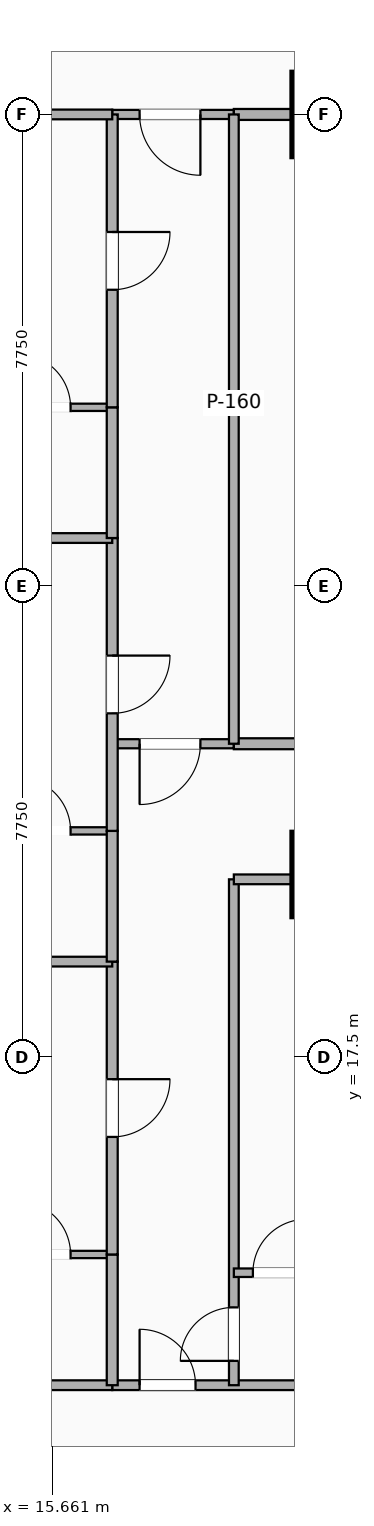
"""IFC4 building model, lengths in metres.
Left out: names, types, materials, properties, quantities, classifications, styles, units other than length and angle.
Written with IfcOpenShell. Run it as: python <this file> out.ifc"""

import sys

from ifc_helpers import new_model, si_unit, direction, frame, frame_2d, origin, origin_2d, place, context, subcontext, project, spatial, rectangle, extrude, element, fill, save


model = new_model("IFC4")
c1 = context("Model", 3, precision=1e-05, world=origin(), true_north=direction((0.0, 1.0)))
c2 = subcontext(c1, "Body", "Model", "MODEL_VIEW")
j1 = project(units=[si_unit("LENGTHUNIT", "METRE"), si_unit("PLANEANGLEUNIT", "RADIAN")], contexts=[c1])
p1 = place(None, origin())
s1 = spatial("IfcSite", under=j1, at=p1, CompositionType="ELEMENT")
p2 = place(p1, origin())
s2 = spatial("IfcBuilding", under=s1, at=p2, CompositionType="ELEMENT")
p3 = place(p2, frame((0.0, 0.0, 68.4)))
s3 = spatial("IfcBuildingStorey", under=s2, at=p3, CompositionType="ELEMENT", Elevation=68.4)
for number, where, z_axis, x_axis in (
    (1, (20.3, 20.5, -0.28), (0.0, 0.0, 1.0), (1.0, 0.0, 0.0)),
    (2, (20.3, 33.0, -0.28), (0.0, 0.0, 1.0), (1.0, 0.0, 0.0)),
):
    element("IfcColumn", number, at=place(p3, frame(where, z_axis=z_axis, x_axis=x_axis)), inside=s3, PredefinedType="COLUMN", context=c2, shape_type="SweptSolid", body=[
        extrude(rectangle(XDim=1.4, YDim=1.4, at=origin_2d()), origin(), (0.0, 0.0, 1.0), 3.5),
    ])
p4 = place(p3, frame((16.65, 12.1, 0.0), z_axis=(0.0, 0.0, 1.0), x_axis=(1.0, 0.0, 0.0)))
e3 = element("IfcWall", 3, at=p4, inside=s3, PredefinedType="PARTITIONING", context=c2, shape_type="SweptSolid", body=[
    extrude(rectangle(XDim=3.65, YDim=0.16, at=frame_2d((1.825, 0.0))), origin(), (0.0, 0.0, 1.0), 2.51),
])
p5 = place(p4, frame((1.37, 0.0, 0.0), z_axis=(0.0, 0.0, 1.0), x_axis=(-1.0, 0.0, 0.0)))
e4 = element("IfcOpeningElement", 4, at=p5, cuts=e3, PredefinedType="OPENING", context=c2, shape_type="SweptSolid", body=[
    extrude(rectangle(XDim=0.92, YDim=2.08, at=frame_2d((0.46, 1.04))), frame((0.0, 0.09, 0.0), z_axis=(0.0, -1.0, 0.0), x_axis=(1.0, 0.0, 0.0)), (0.0, 0.0, 1.0), 0.18),
])
p6 = place(p3, frame((18.65, 12.1, 0.0), z_axis=(0.0, 0.0, 1.0), x_axis=(0.0, 1.0, 0.0)))
e5 = element("IfcWall", 5, at=p6, inside=s3, PredefinedType="PARTITIONING", context=c2, shape_type="SweptSolid", body=[
    extrude(rectangle(XDim=8.32, YDim=0.16, at=frame_2d((4.16, 0.0))), origin(), (0.0, 0.0, 1.0), 2.51),
])
p7 = place(p6, frame((1.28, 0.0, 0.0), z_axis=(0.0, 0.0, 1.0), x_axis=(-1.0, 0.0, 0.0)))
e6 = element("IfcOpeningElement", 6, at=p7, cuts=e5, PredefinedType="OPENING", context=c2, shape_type="SweptSolid", body=[
    extrude(rectangle(XDim=0.88, YDim=2.08, at=frame_2d((0.44, 1.04))), frame((0.0, 0.09, 0.0), z_axis=(0.0, -1.0, 0.0), x_axis=(1.0, 0.0, 0.0)), (0.0, 0.0, 1.0), 0.18),
])
p8 = place(p3, frame((18.65, 20.42, 0.0), z_axis=(0.0, 0.0, 1.0), x_axis=(1.0, 0.0, 0.0)))
e7 = element("IfcWall", 7, at=p8, inside=s3, PredefinedType="PARTITIONING", context=c2, shape_type="SweptSolid", body=[
    extrude(rectangle(XDim=1.65, YDim=0.16, at=frame_2d((0.825, 0.0))), origin(), (0.0, 0.0, 1.0), 2.51),
])
p9 = place(p3, frame((16.65, 22.65, 0.0), z_axis=(0.0, 0.0, 1.0), x_axis=(1.0, 0.0, 0.0)))
e8 = element("IfcWall", 8, at=p9, inside=s3, PredefinedType="PARTITIONING", context=c2, shape_type="SweptSolid", body=[
    extrude(rectangle(XDim=2.0, YDim=0.15, at=frame_2d((1.0, 0.0))), origin(), (0.0, 0.0, 1.0), 3.22),
])
p10 = place(p9, frame((0.45, 0.0, 0.0)))
e9 = element("IfcOpeningElement", 9, at=p10, cuts=e8, PredefinedType="OPENING", context=c2, shape_type="SweptSolid", body=[
    extrude(rectangle(XDim=1.0, YDim=2.15, at=frame_2d((0.5, 1.075))), frame((0.0, 0.085, 0.0), z_axis=(0.0, -1.0, 0.0), x_axis=(1.0, 0.0, 0.0)), (0.0, 0.0, 1.0), 0.17),
])
p11 = place(p3, frame((16.65, 33.0, 0.0), z_axis=(0.0, 0.0, 1.0), x_axis=(1.0, 0.0, 0.0)))
e10 = element("IfcWall", 10, at=p11, inside=s3, PredefinedType="PARTITIONING", context=c2, shape_type="SweptSolid", body=[
    extrude(rectangle(XDim=2.0, YDim=0.15, at=frame_2d((1.0, 0.0))), origin(), (0.0, 0.0, 1.0), 2.51),
])
p12 = place(p11, frame((0.45, 0.0, 0.0)))
e11 = element("IfcOpeningElement", 11, at=p12, cuts=e10, PredefinedType="OPENING", context=c2, shape_type="SweptSolid", body=[
    extrude(rectangle(XDim=1.0, YDim=2.15, at=frame_2d((0.5, 1.075))), frame((0.0, 0.085, 0.0), z_axis=(0.0, -1.0, 0.0), x_axis=(1.0, 0.0, 0.0)), (0.0, 0.0, 1.0), 0.17),
])
p13 = place(p3, frame((18.65, 22.65, 0.0), z_axis=(0.0, 0.0, 1.0), x_axis=(1.0, 0.0, 0.0)))
e12 = element("IfcWall", 12, at=p13, inside=s3, PredefinedType="PARTITIONING", context=c2, shape_type="SweptSolid", body=[
    extrude(rectangle(XDim=5.45, YDim=0.18, at=frame_2d((2.725, 0.0))), origin(), (0.0, 0.0, 1.0), 2.51),
])
p14 = place(p13, frame((2.25, 0.0, 0.0)))
e13 = element("IfcOpeningElement", 13, at=p14, cuts=e12, PredefinedType="OPENING", context=c2, shape_type="SweptSolid", body=[
    extrude(rectangle(XDim=0.95, YDim=2.15, at=frame_2d((0.475, 1.075))), frame((0.0, 0.1, 0.0), z_axis=(0.0, -1.0, 0.0), x_axis=(1.0, 0.0, 0.0)), (0.0, 0.0, 1.0), 0.2),
])
p15 = place(p3, frame((18.65, 33.0, 0.0), z_axis=(0.0, 0.0, 1.0), x_axis=(1.0, 0.0, 0.0)))
e14 = element("IfcWall", 14, at=p15, inside=s3, PredefinedType="PARTITIONING", context=c2, shape_type="SweptSolid", body=[
    extrude(rectangle(XDim=5.45, YDim=0.18, at=frame_2d((2.725, 0.0))), origin(), (0.0, 0.0, 1.0), 2.51),
])
p16 = place(p3, frame((18.65, 22.65, 0.0), z_axis=(0.0, 0.0, 1.0), x_axis=(0.0, 1.0, 0.0)))
e15 = element("IfcWall", 15, at=p16, inside=s3, PredefinedType="PARTITIONING", context=c2, shape_type="SweptSolid", body=[
    extrude(rectangle(XDim=10.35, YDim=0.16, at=frame_2d((5.175, 0.0))), origin(), (0.0, 0.0, 1.0), 2.51),
])
p17 = place(p3, frame((11.47, 12.1, 0.0), z_axis=(0.0, 0.0, 1.0), x_axis=(1.0, 0.0, 0.0)))
e16 = element("IfcWall", 16, at=p17, inside=s3, PredefinedType="PARTITIONING", context=c2, shape_type="SweptSolid", body=[
    extrude(rectangle(XDim=5.18, YDim=0.16, at=frame_2d((2.59, 0.0))), origin(), (0.0, 0.0, 1.0), 2.583),
])
p18 = place(p3, frame((14.4, 14.25, 0.0), z_axis=(0.0, 0.0, 1.0), x_axis=(1.0, 0.0, 0.0)))
e17 = element("IfcWall", 17, at=p18, inside=s3, PredefinedType="PARTITIONING", context=c2, shape_type="SweptSolid", body=[
    extrude(rectangle(XDim=2.25, YDim=0.12, at=frame_2d((1.125, 0.0))), origin(), (0.0, 0.0, 1.0), 3.22),
])
p19 = place(p18, frame((1.565, 0.0, 0.0), z_axis=(0.0, 0.0, 1.0), x_axis=(-1.0, 0.0, 0.0)))
e18 = element("IfcOpeningElement", 18, at=p19, cuts=e17, PredefinedType="OPENING", context=c2, shape_type="SweptSolid", body=[
    extrude(rectangle(XDim=0.88, YDim=2.08, at=frame_2d((0.44, 1.04))), frame((0.0, 0.07, 0.0), z_axis=(0.0, -1.0, 0.0), x_axis=(1.0, 0.0, 0.0)), (0.0, 0.0, 1.0), 0.14),
])
p20 = place(p3, frame((16.65, 12.1, 0.0), z_axis=(0.0, 0.0, 1.0), x_axis=(0.0, 1.0, 0.0)))
e19 = element("IfcWall", 19, at=p20, inside=s3, PredefinedType="PARTITIONING", context=c2, shape_type="SweptSolid", body=[
    extrude(rectangle(XDim=2.15, YDim=0.18, at=frame_2d((1.075, 0.0))), origin(), (0.0, 0.0, 1.0), 2.902),
])
p21 = place(p3, frame((16.65, 14.25, 0.0), z_axis=(0.0, 0.0, 1.0), x_axis=(0.0, 1.0, 0.0)))
e20 = element("IfcWall", 20, at=p21, inside=s3, PredefinedType="PARTITIONING", context=c2, shape_type="SweptSolid", body=[
    extrude(rectangle(XDim=4.817, YDim=0.18, at=frame_2d((2.408, 0.0))), origin(), (0.0, 0.0, 1.0), 2.902),
])
p22 = place(p21, frame((1.933, 0.0, 0.0)))
e21 = element("IfcOpeningElement", 21, at=p22, cuts=e20, PredefinedType="OPENING", context=c2, shape_type="SweptSolid", body=[
    extrude(rectangle(XDim=0.95, YDim=2.15, at=frame_2d((0.475, 1.075))), frame((0.0, 0.1, 0.0), z_axis=(0.0, -1.0, 0.0), x_axis=(1.0, 0.0, 0.0)), (0.0, 0.0, 1.0), 0.2),
])
p23 = place(p3, frame((11.47, 19.067, 0.0), z_axis=(0.0, 0.0, 1.0), x_axis=(1.0, 0.0, 0.0)))
e22 = element("IfcWall", 22, at=p23, inside=s3, PredefinedType="PARTITIONING", context=c2, shape_type="SweptSolid", body=[
    extrude(rectangle(XDim=5.18, YDim=0.16, at=frame_2d((2.59, 0.0))), origin(), (0.0, 0.0, 1.0), 2.583),
])
p24 = place(p3, frame((14.4, 21.217, 0.0), z_axis=(0.0, 0.0, 1.0), x_axis=(1.0, 0.0, 0.0)))
e23 = element("IfcWall", 23, at=p24, inside=s3, PredefinedType="PARTITIONING", context=c2, shape_type="SweptSolid", body=[
    extrude(rectangle(XDim=2.25, YDim=0.12, at=frame_2d((1.125, 0.0))), origin(), (0.0, 0.0, 1.0), 3.22),
])
p25 = place(p24, frame((1.565, 0.0, 0.0), z_axis=(0.0, 0.0, 1.0), x_axis=(-1.0, 0.0, 0.0)))
e24 = element("IfcOpeningElement", 24, at=p25, cuts=e23, PredefinedType="OPENING", context=c2, shape_type="SweptSolid", body=[
    extrude(rectangle(XDim=0.88, YDim=2.08, at=frame_2d((0.44, 1.04))), frame((0.0, 0.07, 0.0), z_axis=(0.0, -1.0, 0.0), x_axis=(1.0, 0.0, 0.0)), (0.0, 0.0, 1.0), 0.14),
])
p26 = place(p3, frame((16.65, 19.067, 0.0), z_axis=(0.0, 0.0, 1.0), x_axis=(0.0, 1.0, 0.0)))
e25 = element("IfcWall", 25, at=p26, inside=s3, PredefinedType="PARTITIONING", context=c2, shape_type="SweptSolid", body=[
    extrude(rectangle(XDim=2.15, YDim=0.18, at=frame_2d((1.075, 0.0))), origin(), (0.0, 0.0, 1.0), 2.51),
])
p27 = place(p3, frame((16.65, 21.217, 0.0), z_axis=(0.0, 0.0, 1.0), x_axis=(0.0, 1.0, 0.0)))
e26 = element("IfcWall", 26, at=p27, inside=s3, PredefinedType="PARTITIONING", context=c2, shape_type="SweptSolid", body=[
    extrude(rectangle(XDim=4.816, YDim=0.18, at=frame_2d((2.408, 0.0))), origin(), (0.0, 0.0, 1.0), 2.788),
])
p28 = place(p27, frame((1.933, 0.0, 0.0)))
e27 = element("IfcOpeningElement", 27, at=p28, cuts=e26, PredefinedType="OPENING", context=c2, shape_type="SweptSolid", body=[
    extrude(rectangle(XDim=0.95, YDim=2.15, at=frame_2d((0.475, 1.075))), frame((0.0, 0.1, 0.0), z_axis=(0.0, -1.0, 0.0), x_axis=(1.0, 0.0, 0.0)), (0.0, 0.0, 1.0), 0.2),
])
p29 = place(p3, frame((11.47, 26.033, 0.0), z_axis=(0.0, 0.0, 1.0), x_axis=(1.0, 0.0, 0.0)))
e28 = element("IfcWall", 28, at=p29, inside=s3, PredefinedType="PARTITIONING", context=c2, shape_type="SweptSolid", body=[
    extrude(rectangle(XDim=5.18, YDim=0.16, at=frame_2d((2.59, 0.0))), origin(), (0.0, 0.0, 1.0), 2.583),
])
p30 = place(p3, frame((14.4, 28.183, 0.0), z_axis=(0.0, 0.0, 1.0), x_axis=(1.0, 0.0, 0.0)))
e29 = element("IfcWall", 29, at=p30, inside=s3, PredefinedType="PARTITIONING", context=c2, shape_type="SweptSolid", body=[
    extrude(rectangle(XDim=2.25, YDim=0.12, at=frame_2d((1.125, 0.0))), origin(), (0.0, 0.0, 1.0), 3.22),
])
p31 = place(p30, frame((1.565, 0.0, 0.0), z_axis=(0.0, 0.0, 1.0), x_axis=(-1.0, 0.0, 0.0)))
e30 = element("IfcOpeningElement", 30, at=p31, cuts=e29, PredefinedType="OPENING", context=c2, shape_type="SweptSolid", body=[
    extrude(rectangle(XDim=0.88, YDim=2.08, at=frame_2d((0.44, 1.04))), frame((0.0, 0.07, 0.0), z_axis=(0.0, -1.0, 0.0), x_axis=(1.0, 0.0, 0.0)), (0.0, 0.0, 1.0), 0.14),
])
p32 = place(p3, frame((16.65, 26.033, 0.0), z_axis=(0.0, 0.0, 1.0), x_axis=(0.0, 1.0, 0.0)))
e31 = element("IfcWall", 31, at=p32, inside=s3, PredefinedType="PARTITIONING", context=c2, shape_type="SweptSolid", body=[
    extrude(rectangle(XDim=2.15, YDim=0.18, at=frame_2d((1.075, 0.0))), origin(), (0.0, 0.0, 1.0), 3.22),
])
p33 = place(p3, frame((16.65, 28.183, 0.0), z_axis=(0.0, 0.0, 1.0), x_axis=(0.0, 1.0, 0.0)))
e32 = element("IfcWall", 32, at=p33, inside=s3, PredefinedType="PARTITIONING", context=c2, shape_type="SweptSolid", body=[
    extrude(rectangle(XDim=4.817, YDim=0.18, at=frame_2d((2.408, 0.0))), origin(), (0.0, 0.0, 1.0), 2.51),
])
p34 = place(p33, frame((1.933, 0.0, 0.0)))
e33 = element("IfcOpeningElement", 33, at=p34, cuts=e32, PredefinedType="OPENING", context=c2, shape_type="SweptSolid", body=[
    extrude(rectangle(XDim=0.95, YDim=2.15, at=frame_2d((0.475, 1.075))), frame((0.0, 0.1, 0.0), z_axis=(0.0, -1.0, 0.0), x_axis=(1.0, 0.0, 0.0)), (0.0, 0.0, 1.0), 0.2),
])
p35 = place(p3, frame((11.47, 33.0, 0.0), z_axis=(0.0, 0.0, 1.0), x_axis=(1.0, 0.0, 0.0)))
e34 = element("IfcWall", 34, at=p35, inside=s3, PredefinedType="PARTITIONING", context=c2, shape_type="SweptSolid", body=[
    extrude(rectangle(XDim=5.18, YDim=0.16, at=frame_2d((2.59, 0.0))), origin(), (0.0, 0.0, 1.0), 2.51),
])
p36 = place(p3, frame((18.65, 13.95, 0.0), z_axis=(0.0, 0.0, 1.0), x_axis=(1.0, 0.0, 0.0)))
e35 = element("IfcWall", 35, at=p36, inside=s3, PredefinedType="PARTITIONING", context=c2, shape_type="SweptSolid", body=[
    extrude(rectangle(XDim=1.6, YDim=0.14, at=frame_2d((0.8, 0.0))), origin(), (0.0, 0.0, 1.0), 2.51),
])
p37 = place(p36, frame((1.193, 0.0, 0.0), z_axis=(0.0, 0.0, 1.0), x_axis=(-1.0, 0.0, 0.0)))
e36 = element("IfcOpeningElement", 36, at=p37, cuts=e35, PredefinedType="OPENING", context=c2, shape_type="SweptSolid", body=[
    extrude(rectangle(XDim=0.88, YDim=2.08, at=frame_2d((0.44, 1.04))), frame((0.0, 0.08, 0.0), z_axis=(0.0, -1.0, 0.0), x_axis=(1.0, 0.0, 0.0)), (0.0, 0.0, 1.0), 0.16),
])
p38 = place(p5, origin())
e37 = element("IfcDoor", 37, at=p38, inside=s3, OperationType="SINGLE_SWING_LEFT", PredefinedType="DOOR", context=c2, shape_type="SweptSolid", body=[
    extrude(rectangle(XDim=0.92, YDim=2.08, at=frame_2d((0.46, 1.04))), frame((0.0, 0.025, 0.0), z_axis=(0.0, -1.0, 0.0), x_axis=(1.0, 0.0, 0.0)), (0.0, 0.0, 1.0), 0.05),
])
fill(e4, e37)
p39 = place(p7, origin())
e38 = element("IfcDoor", 38, at=p39, inside=s3, OperationType="SINGLE_SWING_LEFT", PredefinedType="DOOR", context=c2, shape_type="SweptSolid", body=[
    extrude(rectangle(XDim=0.88, YDim=2.08, at=frame_2d((0.44, 1.04))), frame((0.0, 0.025, 0.0), z_axis=(0.0, -1.0, 0.0), x_axis=(1.0, 0.0, 0.0)), (0.0, 0.0, 1.0), 0.05),
])
fill(e6, e38)
p40 = place(p10, origin())
e39 = element("IfcDoor", 39, at=p40, inside=s3, OperationType="SINGLE_SWING_LEFT", PredefinedType="DOOR", context=c2, shape_type="SweptSolid", body=[
    extrude(rectangle(XDim=1.0, YDim=2.15, at=frame_2d((0.5, 1.075))), frame((0.0, 0.025, 0.0), z_axis=(0.0, -1.0, 0.0), x_axis=(1.0, 0.0, 0.0)), (0.0, 0.0, 1.0), 0.05),
])
fill(e9, e39)
p41 = place(p12, origin())
e40 = element("IfcDoor", 40, at=p41, inside=s3, OperationType="SINGLE_SWING_RIGHT", PredefinedType="DOOR", context=c2, shape_type="SweptSolid", body=[
    extrude(rectangle(XDim=1.0, YDim=2.15, at=frame_2d((0.5, 1.075))), frame((0.0, 0.025, 0.0), z_axis=(0.0, -1.0, 0.0), x_axis=(1.0, 0.0, 0.0)), (0.0, 0.0, 1.0), 0.05),
])
fill(e11, e40)
p42 = place(p19, origin())
e41 = element("IfcDoor", 41, at=p42, inside=s3, OperationType="SINGLE_SWING_LEFT", PredefinedType="DOOR", context=c2, shape_type="SweptSolid", body=[
    extrude(rectangle(XDim=0.88, YDim=2.08, at=frame_2d((0.44, 1.04))), frame((0.0, 0.025, 0.0), z_axis=(0.0, -1.0, 0.0), x_axis=(1.0, 0.0, 0.0)), (0.0, 0.0, 1.0), 0.05),
])
fill(e18, e41)
p43 = place(p22, origin())
e42 = element("IfcDoor", 42, at=p43, inside=s3, OperationType="SINGLE_SWING_RIGHT", PredefinedType="DOOR", context=c2, shape_type="SweptSolid", body=[
    extrude(rectangle(XDim=0.95, YDim=2.15, at=frame_2d((0.475, 1.075))), frame((0.0, 0.025, 0.0), z_axis=(0.0, -1.0, 0.0), x_axis=(1.0, 0.0, 0.0)), (0.0, 0.0, 1.0), 0.05),
])
fill(e21, e42)
p44 = place(p25, origin())
e43 = element("IfcDoor", 43, at=p44, inside=s3, OperationType="SINGLE_SWING_LEFT", PredefinedType="DOOR", context=c2, shape_type="SweptSolid", body=[
    extrude(rectangle(XDim=0.88, YDim=2.08, at=frame_2d((0.44, 1.04))), frame((0.0, 0.025, 0.0), z_axis=(0.0, -1.0, 0.0), x_axis=(1.0, 0.0, 0.0)), (0.0, 0.0, 1.0), 0.05),
])
fill(e24, e43)
p45 = place(p28, origin())
e44 = element("IfcDoor", 44, at=p45, inside=s3, OperationType="SINGLE_SWING_RIGHT", PredefinedType="DOOR", context=c2, shape_type="SweptSolid", body=[
    extrude(rectangle(XDim=0.95, YDim=2.15, at=frame_2d((0.475, 1.075))), frame((0.0, 0.025, 0.0), z_axis=(0.0, -1.0, 0.0), x_axis=(1.0, 0.0, 0.0)), (0.0, 0.0, 1.0), 0.05),
])
fill(e27, e44)
p46 = place(p31, origin())
e45 = element("IfcDoor", 45, at=p46, inside=s3, OperationType="SINGLE_SWING_LEFT", PredefinedType="DOOR", context=c2, shape_type="SweptSolid", body=[
    extrude(rectangle(XDim=0.88, YDim=2.08, at=frame_2d((0.44, 1.04))), frame((0.0, 0.025, 0.0), z_axis=(0.0, -1.0, 0.0), x_axis=(1.0, 0.0, 0.0)), (0.0, 0.0, 1.0), 0.05),
])
fill(e30, e45)
p47 = place(p34, origin())
e46 = element("IfcDoor", 46, at=p47, inside=s3, OperationType="SINGLE_SWING_RIGHT", PredefinedType="DOOR", context=c2, shape_type="SweptSolid", body=[
    extrude(rectangle(XDim=0.95, YDim=2.15, at=frame_2d((0.475, 1.075))), frame((0.0, 0.025, 0.0), z_axis=(0.0, -1.0, 0.0), x_axis=(1.0, 0.0, 0.0)), (0.0, 0.0, 1.0), 0.05),
])
fill(e33, e46)
p48 = place(p37, origin())
e47 = element("IfcDoor", 47, at=p48, inside=s3, OperationType="SINGLE_SWING_RIGHT", PredefinedType="DOOR", context=c2, shape_type="SweptSolid", body=[
    extrude(rectangle(XDim=0.88, YDim=2.08, at=frame_2d((0.44, 1.04))), frame((0.0, 0.025, 0.0), z_axis=(0.0, -1.0, 0.0), x_axis=(1.0, 0.0, 0.0)), (0.0, 0.0, 1.0), 0.05),
])
fill(e36, e47)
save(model, sys.argv[1])
